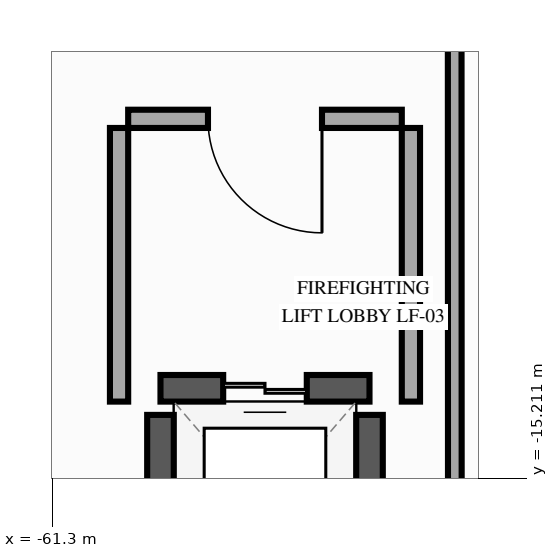
"""IFC4 building model, lengths in metres.
Left out: names, types, materials, properties, quantities, classifications, styles, units other than length and angle.
Written with IfcOpenShell. Run it as: python <this file> out.ifc"""

import sys

from ifc_helpers import new_model, si_unit, direction, frame, frame_2d, origin, place, context, subcontext, project, spatial, rectangle, extrude, element, fill, save


model = new_model("IFC4")
c1 = context("Model", 3, precision=1e-05, world=origin(), true_north=direction((0.0, 1.0)))
c2 = subcontext(c1, "Body", "Model", "MODEL_VIEW")
j1 = project(units=[si_unit("LENGTHUNIT", "METRE"), si_unit("PLANEANGLEUNIT", "RADIAN")], contexts=[c1])
p1 = place(None, origin())
s1 = spatial("IfcSite", under=j1, at=p1, CompositionType="ELEMENT")
p2 = place(p1, origin())
s2 = spatial("IfcBuilding", under=s1, at=p2, CompositionType="ELEMENT")
p3 = place(p2, frame((0.0, 0.0, 5.4)))
s3 = spatial("IfcBuildingStorey", under=s2, at=p3, CompositionType="ELEMENT", Elevation=5.4)
p4 = place(p3, frame((-57.125, -14.025, 0.0), z_axis=(0.0, 0.0, 1.0), x_axis=(-1.0, 0.0, 0.0)))
e1 = element("IfcWall", 1, at=p4, inside=s3, PredefinedType="SHEAR", context=c2, shape_type="SweptSolid", body=[
    extrude(rectangle(XDim=2.75, YDim=0.35, at=frame_2d((1.375, 0.0))), origin(), (0.0, 0.0, 1.0), 5.15),
])
p5 = place(p4, frame((0.825, 0.0, 0.0)))
e2 = element("IfcOpeningElement", 2, at=p5, cuts=e1, PredefinedType="OPENING", context=c2, shape_type="SweptSolid", body=[
    extrude(rectangle(XDim=1.1, YDim=2.2, at=frame_2d((0.55, 1.1))), frame((0.0, 0.185, 0.0), z_axis=(0.0, -1.0, 0.0), x_axis=(1.0, 0.0, 0.0)), (0.0, 0.0, 1.0), 0.37),
])
for number, where, z_axis, x_axis in (
    (3, (-59.875, -16.825, 0.0), (0.0, 0.0, 1.0), (0.0, 1.0, 0.0)),
    (4, (-57.125, -16.825, 0.0), (0.0, 0.0, 1.0), (0.0, 1.0, 0.0)),
):
    element("IfcWall", number, at=place(p3, frame(where, z_axis=z_axis, x_axis=x_axis)), inside=s3, PredefinedType="SHEAR", context=c2, shape_type="SweptSolid", body=[
        extrude(rectangle(XDim=2.45, YDim=0.35, at=frame_2d((1.225, 0.0))), origin(), (0.0, 0.0, 1.0), 5.15),
    ])
p6 = place(p3, frame((-56.7, -10.48, 0.0), z_axis=(0.0, 0.0, 1.0), x_axis=(-1.0, 0.0, 0.0)))
e5 = element("IfcWall", 5, at=p6, inside=s3, PredefinedType="PARTITIONING", context=c2, shape_type="SweptSolid", body=[
    extrude(rectangle(XDim=3.6, YDim=0.24, at=frame_2d((1.8, 0.0))), origin(), (0.0, 0.0, 1.0), 5.1),
])
p7 = place(p6, frame((1.05, 0.0, 0.0)))
e6 = element("IfcOpeningElement", 6, at=p7, cuts=e5, PredefinedType="OPENING", context=c2, shape_type="SweptSolid", body=[
    extrude(rectangle(XDim=1.5, YDim=2.2, at=frame_2d((0.75, 1.1))), frame((0.0, 0.13, 0.0), z_axis=(0.0, -1.0, 0.0), x_axis=(1.0, 0.0, 0.0)), (0.0, 0.0, 1.0), 0.26),
])
for number, where, z_axis, x_axis in (
    (7, (-60.42, -14.2, 0.0), (0.0, 0.0, 1.0), (0.0, 1.0, 0.0)),
    (8, (-56.58, -14.2, 0.0), (0.0, 0.0, 1.0), (0.0, 1.0, 0.0)),
):
    element("IfcWall", number, at=place(p3, frame(where, z_axis=z_axis, x_axis=x_axis)), inside=s3, PredefinedType="PARTITIONING", context=c2, shape_type="SweptSolid", body=[
        extrude(rectangle(XDim=3.6, YDim=0.24, at=frame_2d((1.8, 0.0))), origin(), (0.0, 0.0, 1.0), 4.675),
    ])
p8 = place(p3, frame((-56.0, -22.7, 0.0), z_axis=(0.0, 0.0, 1.0), x_axis=(-0.000293067118, 0.999999957056, 0.0)))
e9 = element("IfcWall", 9, at=p8, inside=s3, PredefinedType="PARTITIONING", context=c2, shape_type="SweptSolid", body=[
    extrude(rectangle(XDim=13.329, YDim=0.18, at=frame_2d((6.665, 0.0))), origin(), (0.0, 0.0, 1.0), 4.525),
])
p9 = place(p8, frame((2.066, 0.0, 0.0)))
e10 = element("IfcOpeningElement", 10, at=p9, cuts=e9, PredefinedType="OPENING", context=c2, shape_type="SweptSolid", body=[
    extrude(rectangle(XDim=1.2, YDim=2.2, at=frame_2d((0.6, 1.1))), frame((0.0, 0.1, 0.0), z_axis=(0.0, -1.0, 0.0), x_axis=(1.0, 0.0, 0.0)), (0.0, 0.0, 1.0), 0.2),
])
p10 = place(p5, origin())
e11 = element("IfcDoor", 11, at=p10, inside=s3, OperationType="DOUBLE_DOOR_SLIDING", PredefinedType="DOOR", context=c2, shape_type="SweptSolid", body=[
    extrude(rectangle(XDim=1.1, YDim=2.2, at=frame_2d((0.55, 1.1))), frame((0.0, 0.025, 0.0), z_axis=(0.0, -1.0, 0.0), x_axis=(1.0, 0.0, 0.0)), (0.0, 0.0, 1.0), 0.05),
])
fill(e2, e11)
p11 = place(p7, origin())
e12 = element("IfcDoor", 12, at=p11, inside=s3, OperationType="SINGLE_SWING_LEFT", PredefinedType="DOOR", context=c2, shape_type="SweptSolid", body=[
    extrude(rectangle(XDim=1.5, YDim=2.2, at=frame_2d((0.75, 1.1))), frame((0.0, 0.025, 0.0), z_axis=(0.0, -1.0, 0.0), x_axis=(1.0, 0.0, 0.0)), (0.0, 0.0, 1.0), 0.05),
])
fill(e6, e12)
save(model, sys.argv[1])
